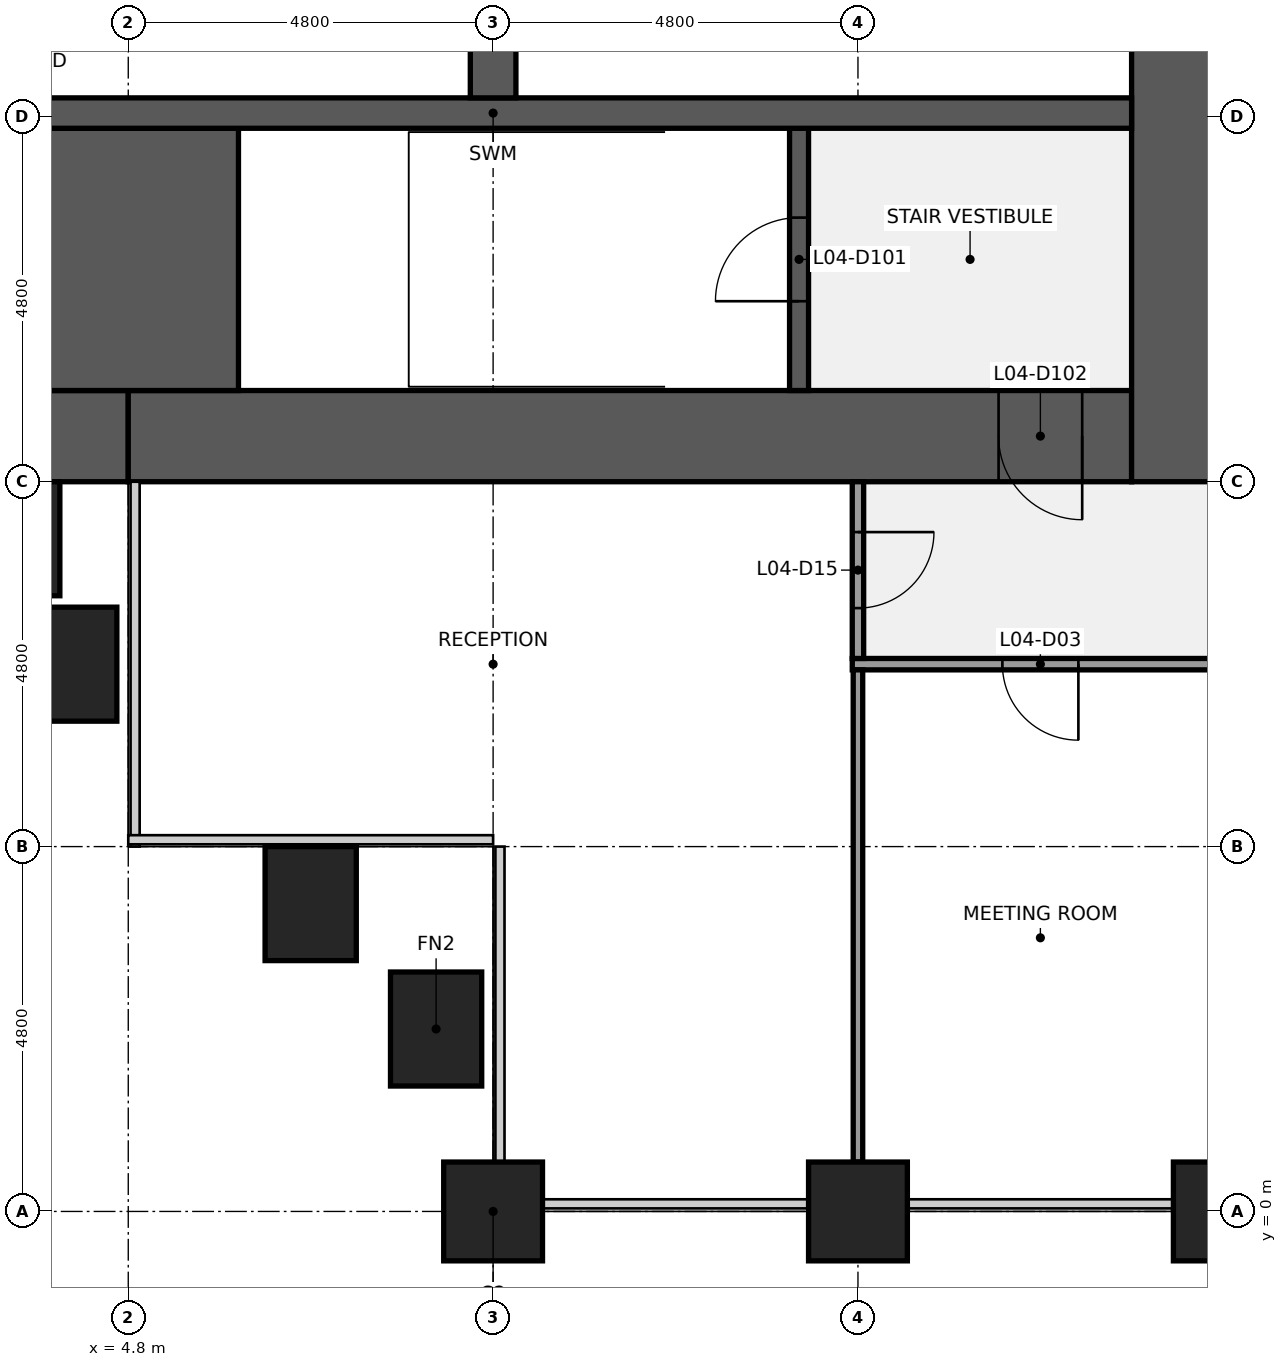
"""IFC4 building model, lengths in metres.
Left out: names, types, materials, properties, quantities, classifications, styles, units other than length and angle.
Written with IfcOpenShell. Run it as: python <this file> out.ifc"""

import sys

from ifc_helpers import new_model, si_unit, direction, frame, frame_2d, origin, origin_2d, place, context, subcontext, project, spatial, rectangle, extrude, element, fill, save


model = new_model("IFC4")
c1 = context("Model", 3, precision=1e-05, world=origin(), true_north=direction((0.0, 1.0)))
c2 = subcontext(c1, "Body", "Model", "MODEL_VIEW")
j1 = project(units=[si_unit("LENGTHUNIT", "METRE"), si_unit("PLANEANGLEUNIT", "RADIAN")], contexts=[c1])
p1 = place(None, origin())
s1 = spatial("IfcSite", under=j1, at=p1, CompositionType="ELEMENT")
p2 = place(p1, origin())
s2 = spatial("IfcBuilding", under=s1, at=p2, CompositionType="ELEMENT")
p3 = place(p2, frame((0.0, 0.0, 25.8)))
s3 = spatial("IfcBuildingStorey", under=s2, at=p3, CompositionType="ELEMENT", Elevation=25.8)
for number, where, z_axis, x_axis in (
    (1, (9.6, 0.0, 0.0), (0.0, 0.0, 1.0), (1.0, 0.0, 0.0)),
    (2, (14.4, 0.0, 0.0), (0.0, 0.0, 1.0), (1.0, 0.0, 0.0)),
    (3, (19.2, 0.0, 0.0), (0.0, 0.0, 1.0), (1.0, 0.0, 0.0)),
):
    element("IfcColumn", number, at=place(p3, frame(where, z_axis=z_axis, x_axis=x_axis)), inside=s3, PredefinedType="COLUMN", context=c2, shape_type="SweptSolid", body=[
        extrude(rectangle(XDim=1.3, YDim=1.3, at=origin_2d()), origin(), (0.0, 0.0, 1.0), 4.4),
    ])
p4 = place(p3, frame((4.8, 10.2, 0.0), z_axis=(0.0, 0.0, 1.0), x_axis=(-1.0, 0.0, 0.0)))
e4 = element("IfcWall", 4, at=p4, inside=s3, PredefinedType="SHEAR", context=c2, shape_type="SweptSolid", body=[
    extrude(rectangle(XDim=3.6, YDim=1.2, at=frame_2d((1.8, 0.0))), origin(), (0.0, 0.0, 1.0), 4.24),
])
p5 = place(p3, frame((18.0, 10.2, 0.0), z_axis=(0.0, 0.0, 1.0), x_axis=(-1.0, 0.0, 0.0)))
e5 = element("IfcWall", 5, at=p5, inside=s3, PredefinedType="SHEAR", context=c2, shape_type="SweptSolid", body=[
    extrude(rectangle(XDim=13.2, YDim=1.2, at=frame_2d((6.6, 0.0))), origin(), (0.0, 0.0, 1.0), 4.24),
])
p6 = place(p5, frame((0.65, 0.0, 0.0)))
e6 = element("IfcOpeningElement", 6, at=p6, cuts=e5, PredefinedType="OPENING", context=c2, shape_type="SweptSolid", body=[
    extrude(rectangle(XDim=1.1, YDim=2.1, at=frame_2d((0.55, 1.05))), frame((0.0, 0.61, 0.0), z_axis=(0.0, -1.0, 0.0), x_axis=(1.0, 0.0, 0.0)), (0.0, 0.0, 1.0), 1.22),
])
p7 = place(p3, frame((18.6, 38.4, 0.0), z_axis=(0.0, 0.0, 1.0), x_axis=(0.0, -1.0, 0.0)))
e7 = element("IfcWall", 7, at=p7, inside=s3, PredefinedType="SHEAR", context=c2, shape_type="SweptSolid", body=[
    extrude(rectangle(XDim=28.8, YDim=1.2, at=frame_2d((14.4, 0.0))), origin(), (0.0, 0.0, 1.0), 4.24),
])
p8 = place(p7, frame((18.3, 0.0, 0.0)))
e8 = element("IfcOpeningElement", 8, at=p8, cuts=e7, PredefinedType="OPENING", context=c2, shape_type="SweptSolid", body=[
    extrude(rectangle(XDim=1.8, YDim=2.1, at=frame_2d((0.9, 1.05))), frame((0.0, 0.61, 0.0), z_axis=(0.0, -1.0, 0.0), x_axis=(1.0, 0.0, 0.0)), (0.0, 0.0, 1.0), 1.22),
])
p9 = place(p7, frame((8.7, 0.0, 0.0)))
e9 = element("IfcOpeningElement", 9, at=p9, cuts=e7, PredefinedType="OPENING", context=c2, shape_type="SweptSolid", body=[
    extrude(rectangle(XDim=1.8, YDim=2.1, at=frame_2d((0.9, 1.05))), frame((0.0, 0.61, 0.0), z_axis=(0.0, -1.0, 0.0), x_axis=(1.0, 0.0, 0.0)), (0.0, 0.0, 1.0), 1.22),
])
p10 = place(p3, frame((1.2, 12.525, 0.0), z_axis=(0.0, 0.0, 1.0), x_axis=(1.0, 0.0, 0.0)))
e10 = element("IfcWall", 10, at=p10, inside=s3, PredefinedType="SHEAR", context=c2, shape_type="SweptSolid", body=[
    extrude(rectangle(XDim=5.05, YDim=3.45, at=frame_2d((2.525, 0.0))), origin(), (0.0, 0.0, 1.0), 4.24),
])
p11 = place(p3, frame((13.625, 10.8, 0.0), z_axis=(0.0, 0.0, 1.0), x_axis=(0.0, 1.0, 0.0)))
e11 = element("IfcWall", 11, at=p11, inside=s3, PredefinedType="SHEAR", context=c2, shape_type="SweptSolid", body=[
    extrude(rectangle(XDim=3.45, YDim=0.25, at=frame_2d((1.725, 0.0))), origin(), (0.0, 0.0, 1.0), 4.24),
])
p12 = place(p11, frame((1.175, 0.0, 0.0)))
e12 = element("IfcOpeningElement", 12, at=p12, cuts=e11, PredefinedType="OPENING", context=c2, shape_type="SweptSolid", body=[
    extrude(rectangle(XDim=1.1, YDim=2.1, at=frame_2d((0.55, 1.05))), frame((0.0, 0.135, 0.0), z_axis=(0.0, -1.0, 0.0), x_axis=(1.0, 0.0, 0.0)), (0.0, 0.0, 1.0), 0.27),
])
p13 = place(p3, frame((1.2, 14.45, 0.0), z_axis=(0.0, 0.0, 1.0), x_axis=(1.0, 0.0, 0.0)))
e13 = element("IfcWall", 13, at=p13, inside=s3, PredefinedType="SHEAR", context=c2, shape_type="SweptSolid", body=[
    extrude(rectangle(XDim=16.8, YDim=0.4, at=frame_2d((8.4, 0.0))), origin(), (0.0, 0.0, 1.0), 4.24),
])
p14 = place(p3, frame((9.6, 14.65, 0.0), z_axis=(0.0, 0.0, 1.0), x_axis=(0.0, 1.0, 0.0)))
e14 = element("IfcWall", 14, at=p14, inside=s3, PredefinedType="SHEAR", context=c2, shape_type="SweptSolid", body=[
    extrude(rectangle(XDim=2.6, YDim=0.6, at=frame_2d((1.3, 0.0))), origin(), (0.0, 0.0, 1.0), 4.24),
])
p15 = place(p3, frame((14.325, 7.2, 0.0), z_axis=(0.0, 0.0, 1.0), x_axis=(1.0, 0.0, 0.0)))
e15 = element("IfcWall", 15, at=p15, inside=s3, PredefinedType="PARTITIONING", context=c2, shape_type="SweptSolid", body=[
    extrude(rectangle(XDim=4.95, YDim=0.15, at=frame_2d((2.475, 0.0))), origin(), (0.0, 0.0, 1.0), 3.27),
])
p16 = place(p15, frame((1.975, 0.0, 0.0)))
e16 = element("IfcOpeningElement", 16, at=p16, cuts=e15, PredefinedType="OPENING", context=c2, shape_type="SweptSolid", body=[
    extrude(rectangle(XDim=1.0, YDim=2.1, at=frame_2d((0.5, 1.05))), frame((0.0, 0.085, 0.0), z_axis=(0.0, -1.0, 0.0), x_axis=(1.0, 0.0, 0.0)), (0.0, 0.0, 1.0), 0.17),
])
p17 = place(p3, frame((14.4, 0.65, 0.0), z_axis=(0.0, 0.0, 1.0), x_axis=(0.0, 1.0, 0.0)))
e17 = element("IfcWall", 17, at=p17, inside=s3, PredefinedType="PARTITIONING", context=c2, shape_type="SweptSolid", body=[
    extrude(rectangle(XDim=6.475, YDim=0.125, at=frame_2d((3.238, 0.0))), origin(), (0.0, 0.0, 1.0), 3.27),
])
p18 = place(p3, frame((14.4, 7.275, 0.0), z_axis=(0.0, 0.0, 1.0), x_axis=(0.0, 1.0, 0.0)))
e18 = element("IfcWall", 18, at=p18, inside=s3, PredefinedType="PARTITIONING", context=c2, shape_type="SweptSolid", body=[
    extrude(rectangle(XDim=2.325, YDim=0.15, at=frame_2d((1.163, 0.0))), origin(), (0.0, 0.0, 1.0), 3.27),
])
p19 = place(p18, frame((0.663, 0.0, 0.0)))
e19 = element("IfcOpeningElement", 19, at=p19, cuts=e18, PredefinedType="OPENING", context=c2, shape_type="SweptSolid", body=[
    extrude(rectangle(XDim=1.0, YDim=2.1, at=frame_2d((0.5, 1.05))), frame((0.0, 0.085, 0.0), z_axis=(0.0, -1.0, 0.0), x_axis=(1.0, 0.0, 0.0)), (0.0, 0.0, 1.0), 0.17),
])
for number, where, z_axis, x_axis in (
    (20, (4.05, 7.2, 0.0), (0.0, 0.0, 1.0), (0.0, 1.0, 0.0)),
    (21, (7.2, 4.05, 0.0), (0.0, 0.0, 1.0), (1.0, 0.0, 0.0)),
    (22, (8.85, 2.4, 0.0), (0.0, 0.0, 1.0), (0.0, 1.0, 0.0)),
):
    element("IfcColumn", number, at=place(p3, frame(where, z_axis=z_axis, x_axis=x_axis)), inside=s3, PredefinedType="PILASTER", context=c2, shape_type="SweptSolid", body=[
        extrude(rectangle(XDim=1.2, YDim=1.5, at=origin_2d()), origin(), (0.0, 0.0, 1.0), 4.4),
    ])
p20 = place(p3, frame((2.4, 8.85, 0.0), z_axis=(0.0, 0.0, 1.0), x_axis=(1.0, 0.0, 0.0)))
e23 = element("IfcColumn", 23, at=p20, inside=s3, PredefinedType="PILASTER", context=c2, shape_type="SweptSolid", body=[
    extrude(rectangle(XDim=3.0, YDim=1.5, at=origin_2d()), origin(), (0.0, 0.0, 1.0), 4.4),
])
for number, where, z_axis, x_axis in (
    (24, (9.6, -1.075, 0.0), (0.0, 0.0, 1.0), (1.0, 0.0, 0.0)),
    (25, (14.4, -1.075, 0.0), (0.0, 0.0, 1.0), (1.0, 0.0, 0.0)),
    (26, (19.2, -1.075, 0.0), (0.0, 0.0, 1.0), (1.0, 0.0, 0.0)),
):
    element("IfcColumn", number, at=place(p3, frame(where, z_axis=z_axis, x_axis=x_axis)), inside=s3, PredefinedType="PILASTER", context=c2, shape_type="SweptSolid", body=[
        extrude(rectangle(XDim=4.2, YDim=0.85, at=origin_2d()), origin(), (0.0, 0.0, 1.0), 4.4),
    ])
p21 = place(p12, origin())
e27 = element("IfcDoor", 27, at=p21, inside=s3, OperationType="SINGLE_SWING_LEFT", PredefinedType="DOOR", context=c2, shape_type="SweptSolid", body=[
    extrude(rectangle(XDim=1.1, YDim=2.1, at=frame_2d((0.55, 1.05))), frame((0.0, 0.025, 0.0), z_axis=(0.0, -1.0, 0.0), x_axis=(1.0, 0.0, 0.0)), (0.0, 0.0, 1.0), 0.05),
])
fill(e12, e27)
p22 = place(p6, origin())
e28 = element("IfcDoor", 28, at=p22, inside=s3, OperationType="SINGLE_SWING_LEFT", PredefinedType="DOOR", context=c2, shape_type="SweptSolid", body=[
    extrude(rectangle(XDim=1.1, YDim=2.1, at=frame_2d((0.55, 1.05))), frame((0.0, 0.025, 0.0), z_axis=(0.0, -1.0, 0.0), x_axis=(1.0, 0.0, 0.0)), (0.0, 0.0, 1.0), 0.05),
])
fill(e6, e28)
p23 = place(p16, origin())
e29 = element("IfcDoor", 29, at=p23, inside=s3, OperationType="SINGLE_SWING_RIGHT", PredefinedType="DOOR", context=c2, shape_type="SweptSolid", body=[
    extrude(rectangle(XDim=1.0, YDim=2.1, at=frame_2d((0.5, 1.05))), frame((0.0, 0.025, 0.0), z_axis=(0.0, -1.0, 0.0), x_axis=(1.0, 0.0, 0.0)), (0.0, 0.0, 1.0), 0.05),
])
fill(e16, e29)
p24 = place(p19, origin())
e30 = element("IfcDoor", 30, at=p24, inside=s3, OperationType="SINGLE_SWING_RIGHT", PredefinedType="DOOR", context=c2, shape_type="SweptSolid", body=[
    extrude(rectangle(XDim=1.0, YDim=2.1, at=frame_2d((0.5, 1.05))), frame((0.0, 0.025, 0.0), z_axis=(0.0, -1.0, 0.0), x_axis=(1.0, 0.0, 0.0)), (0.0, 0.0, 1.0), 0.05),
])
fill(e19, e30)
save(model, sys.argv[1])
